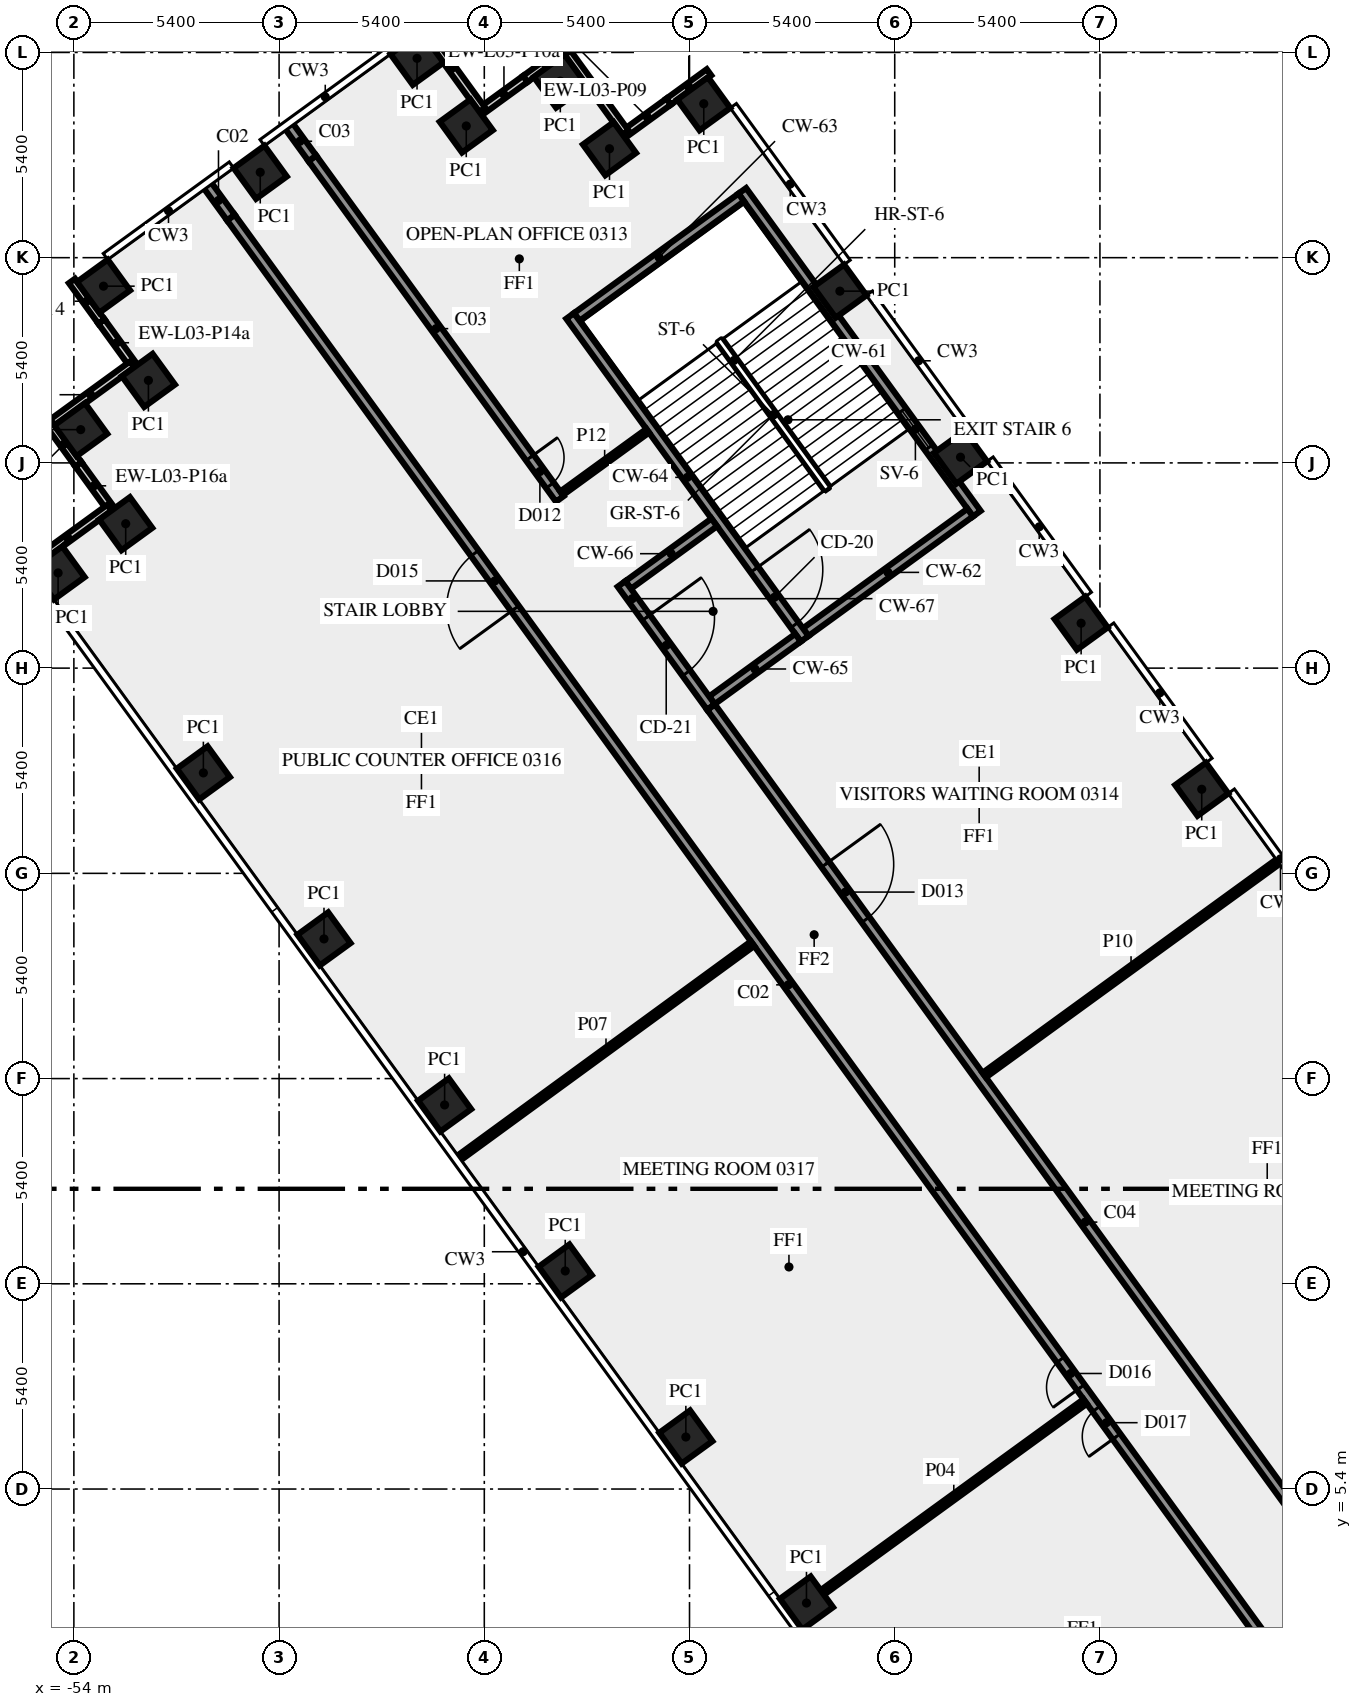
"""IFC4 building model, lengths in metres.
Left out: names, types, materials, properties, quantities, classifications, styles, units other than length and angle.
Written with IfcOpenShell. Run it as: python <this file> out.ifc"""

import sys

from ifc_helpers import new_model, si_unit, direction, frame, frame_2d, origin, origin_2d, place, context, subcontext, project, spatial, rectangle, extrude, element, fill, save


model = new_model("IFC4")
c1 = context("Model", 3, precision=1e-05, world=origin(), true_north=direction((0.0, 1.0)))
c2 = subcontext(c1, "Body", "Model", "MODEL_VIEW")
j1 = project(units=[si_unit("LENGTHUNIT", "METRE"), si_unit("PLANEANGLEUNIT", "RADIAN")], contexts=[c1])
p1 = place(None, origin())
s1 = spatial("IfcSite", under=j1, at=p1, CompositionType="ELEMENT")
p2 = place(p1, origin())
s2 = spatial("IfcBuilding", under=s1, at=p2, CompositionType="ELEMENT")
p3 = place(p2, frame((0.0, 0.0, 16.0)))
s3 = spatial("IfcBuildingStorey", under=s2, at=p3, CompositionType="ELEMENT", Elevation=16.0)
for number, where, z_axis, x_axis in (
    (1, (-24.321, 23.812, 0.0), (0.0, 0.0, 1.0), (-0.588, 0.809, 0.0)),
    (2, (-27.495, 28.181, 0.0), (0.0, 0.0, 1.0), (-0.588, 0.809, 0.0)),
    (3, (-30.669, 32.55, 0.0), (0.0, 0.0, 1.0), (-0.588, 0.809, 0.0)),
    (4, (-33.843, 36.919, 0.0), (0.0, 0.0, 1.0), (-0.588, 0.809, 0.0)),
    (5, (-37.425, 41.85, 0.0), (0.0, 0.0, 1.0), (-0.588, 0.809, 0.0)),
    (6, (-39.906, 40.666, 0.0), (0.0, 0.0, 1.0), (-0.588, 0.809, 0.0)),
    (7, (-41.2, 42.445, 0.0), (0.0, 0.0, 1.0), (-0.588, 0.809, 0.0)),
    (8, (-43.675, 41.265, 0.0), (0.0, 0.0, 1.0), (-0.809, -0.588, 0.0)),
    (9, (-44.97, 43.045, 0.0), (0.0, 0.0, 1.0), (-0.809, -0.588, 0.0)),
    (10, (-49.096, 40.047, 0.0), (0.0, 0.0, 1.0), (-0.809, -0.588, 0.0)),
    (11, (-53.22, 37.05, 0.0), (0.0, 0.0, 1.0), (0.588, -0.809, 0.0)),
    (12, (-52.039, 34.571, 0.0), (0.0, 0.0, 1.0), (-0.809, -0.588, 0.0)),
    (13, (-53.82, 33.275, 0.0), (0.0, 0.0, 1.0), (0.588, -0.809, 0.0)),
    (14, (-52.636, 30.8, 0.0), (0.0, 0.0, 1.0), (-0.809, -0.588, 0.0)),
    (15, (-54.415, 29.505, 0.0), (0.0, 0.0, 1.0), (0.588, -0.809, 0.0)),
    (16, (-50.592, 24.243, 0.0), (0.0, 0.0, 1.0), (0.588, -0.809, 0.0)),
    (17, (-47.418, 19.875, 0.0), (0.0, 0.0, 1.0), (0.588, -0.809, 0.0)),
    (18, (-44.244, 15.506, 0.0), (0.0, 0.0, 1.0), (0.588, -0.809, 0.0)),
    (19, (-41.07, 11.137, 0.0), (0.0, 0.0, 1.0), (0.588, -0.809, 0.0)),
    (20, (-37.896, 6.769, 0.0), (0.0, 0.0, 1.0), (0.588, -0.809, 0.0)),
    (21, (-34.722, 2.4, 0.0), (0.0, 0.0, 1.0), (0.588, -0.809, 0.0)),
):
    element("IfcColumn", number, at=place(p3, frame(where, z_axis=z_axis, x_axis=x_axis)), inside=s3, PredefinedType="COLUMN", context=c2, shape_type="SweptSolid", body=[
        extrude(rectangle(XDim=1.0, YDim=1.0, at=origin_2d()), origin(), (0.0, 0.0, 1.0), 4.1),
    ])
p4 = place(p3, frame((-37.287, 42.678, 0.0), z_axis=(0.0, 0.0, 1.0), x_axis=(-0.809065186597, -0.587718915671, 0.0)))
e22 = element("IfcWall", 22, at=p4, inside=s3, PredefinedType="SOLIDWALL", context=c2, shape_type="SweptSolid", body=[
    extrude(rectangle(XDim=1.315, YDim=0.2, at=frame_2d((0.657, 0.0))), origin(), (0.0, 0.0, 1.0), 4.1),
])
p5 = place(p3, frame((-38.351, 41.905, 0.0), z_axis=(0.0, 0.0, 1.0), x_axis=(-0.809002762913, -0.58780483972, 0.0)))
e23 = element("IfcWall", 23, at=p5, inside=s3, PredefinedType="SOLIDWALL", context=c2, shape_type="SweptSolid", body=[
    extrude(rectangle(XDim=1.385, YDim=0.2, at=frame_2d((0.693, 0.0))), origin(), (0.0, 0.0, 1.0), 3.1),
])
p6 = place(p3, frame((-39.488, 41.094, 0.0), z_axis=(0.0, 0.0, 1.0), x_axis=(-0.587806000234, 0.809001919707, 0.0)))
e24 = element("IfcWall", 24, at=p6, inside=s3, PredefinedType="SOLIDWALL", context=c2, shape_type="SweptSolid", body=[
    extrude(rectangle(XDim=2.7, YDim=0.2, at=frame_2d((1.35, 0.0))), origin(), (0.0, 0.0, 1.0), 4.1),
])
p7 = place(p3, frame((-41.058, 43.275, 0.0), z_axis=(0.0, 0.0, 1.0), x_axis=(-0.809056865039, -0.587730371117, 0.0)))
e25 = element("IfcWall", 25, at=p7, inside=s3, PredefinedType="SOLIDWALL", context=c2, shape_type="SweptSolid", body=[
    extrude(rectangle(XDim=1.316, YDim=0.2, at=frame_2d((0.658, 0.0))), origin(), (0.0, 0.0, 1.0), 4.1),
])
p8 = place(p3, frame((-42.123, 42.502, 0.0), z_axis=(0.0, 0.0, 1.0), x_axis=(-0.808926734208, -0.5879094647, 0.0)))
e26 = element("IfcWall", 26, at=p8, inside=s3, PredefinedType="SOLIDWALL", context=c2, shape_type="SweptSolid", body=[
    extrude(rectangle(XDim=1.384, YDim=0.2, at=frame_2d((0.692, 0.0))), origin(), (0.0, 0.0, 1.0), 3.1),
])
p9 = place(p3, frame((-43.259, 41.691, 0.0), z_axis=(0.0, 0.0, 1.0), x_axis=(-0.587822180636, 0.808990163075, 0.0)))
e27 = element("IfcWall", 27, at=p9, inside=s3, PredefinedType="SOLIDWALL", context=c2, shape_type="SweptSolid", body=[
    extrude(rectangle(XDim=2.7, YDim=0.2, at=frame_2d((1.35, 0.0))), origin(), (0.0, 0.0, 1.0), 4.1),
])
p10 = place(p3, frame((-54.05, 37.188, 0.0), z_axis=(0.0, 0.0, 1.0), x_axis=(0.58786388341, -0.808959859686, 0.0)))
e28 = element("IfcWall", 28, at=p10, inside=s3, PredefinedType="SOLIDWALL", context=c2, shape_type="SweptSolid", body=[
    extrude(rectangle(XDim=1.321, YDim=0.2, at=frame_2d((0.66, 0.0))), origin(), (0.0, 0.0, 1.0), 4.1),
])
p11 = place(p3, frame((-53.273, 36.12, 0.0), z_axis=(0.0, 0.0, 1.0), x_axis=(0.587782252522, -0.809019173827, 0.0)))
e29 = element("IfcWall", 29, at=p11, inside=s3, PredefinedType="SOLIDWALL", context=c2, shape_type="SweptSolid", body=[
    extrude(rectangle(XDim=1.379, YDim=0.2, at=frame_2d((0.69, 0.0))), origin(), (0.0, 0.0, 1.0), 3.1),
])
p12 = place(p3, frame((-52.465, 34.987, 0.0), z_axis=(0.0, 0.0, 1.0), x_axis=(-0.809033161865, -0.587762999008, 0.0)))
e30 = element("IfcWall", 30, at=p12, inside=s3, PredefinedType="SOLIDWALL", context=c2, shape_type="SweptSolid", body=[
    extrude(rectangle(XDim=2.7, YDim=0.2, at=frame_2d((1.35, 0.0))), origin(), (0.0, 0.0, 1.0), 4.1),
])
p13 = place(p3, frame((-54.647, 33.417, 0.0), z_axis=(0.0, 0.0, 1.0), x_axis=(0.587871379726, -0.808954412127, 0.0)))
e31 = element("IfcWall", 31, at=p13, inside=s3, PredefinedType="SOLIDWALL", context=c2, shape_type="SweptSolid", body=[
    extrude(rectangle(XDim=1.305, YDim=0.2, at=frame_2d((0.653, 0.0))), origin(), (0.0, 0.0, 1.0), 4.1),
])
p14 = place(p3, frame((-53.88, 32.361, 0.0), z_axis=(0.0, 0.0, 1.0), x_axis=(0.587776137069, -0.809023616894, 0.0)))
e32 = element("IfcWall", 32, at=p14, inside=s3, PredefinedType="SOLIDWALL", context=c2, shape_type="SweptSolid", body=[
    extrude(rectangle(XDim=1.395, YDim=0.2, at=frame_2d((0.697, 0.0))), origin(), (0.0, 0.0, 1.0), 3.1),
])
p15 = place(p3, frame((-53.063, 31.216, 0.0), z_axis=(0.0, 0.0, 1.0), x_axis=(-0.809033161865, -0.587762999008, 0.0)))
e33 = element("IfcWall", 33, at=p15, inside=s3, PredefinedType="SOLIDWALL", context=c2, shape_type="SweptSolid", body=[
    extrude(rectangle(XDim=2.7, YDim=0.2, at=frame_2d((1.35, 0.0))), origin(), (0.0, 0.0, 1.0), 4.1),
])
p16 = place(p3, frame((-30.24, 31.064, 0.0), z_axis=(0.0, 0.0, 1.0), x_axis=(-0.587795589702, 0.809009483706, 0.0)))
e34 = element("IfcWall", 34, at=p16, inside=s3, PredefinedType="SHEAR", context=c2, shape_type="SweptSolid", body=[
    extrude(rectangle(XDim=10.5, YDim=0.25, at=frame_2d((5.25, 0.0))), origin(), (0.0, 0.0, 1.0), 4.1),
])
p17 = place(p16, frame((2.15, 0.0, 1.0)))
e35 = element("IfcOpeningElement", 35, at=p17, cuts=e34, PredefinedType="OPENING", context=c2, shape_type="SweptSolid", body=[
    extrude(rectangle(XDim=1.2, YDim=1.2, at=frame_2d((0.6, 0.6))), frame((0.0, 0.135, 0.0), z_axis=(0.0, -1.0, 0.0), x_axis=(1.0, 0.0, 0.0)), (0.0, 0.0, 1.0), 0.27),
])
p18 = place(p3, frame((-30.414, 31.092, 0.0), z_axis=(0.0, 0.0, 1.0), x_axis=(-0.8089984606, -0.587810760999, 0.0)))
e36 = element("IfcWall", 36, at=p18, inside=s3, PredefinedType="SHEAR", context=c2, shape_type="SweptSolid", body=[
    extrude(rectangle(XDim=5.35, YDim=0.25, at=frame_2d((2.675, 0.0))), origin(), (0.0, 0.0, 1.0), 4.1),
])
p19 = place(p3, frame((-36.439, 39.384, 0.0), z_axis=(0.0, 0.0, 1.0), x_axis=(-0.809020161303, -0.587780893365, 0.0)))
e37 = element("IfcWall", 37, at=p19, inside=s3, PredefinedType="SHEAR", context=c2, shape_type="SweptSolid", body=[
    extrude(rectangle(XDim=5.35, YDim=0.25, at=frame_2d((2.675, 0.0))), origin(), (0.0, 0.0, 1.0), 4.1),
])
p20 = place(p3, frame((-40.942, 36.267, 0.0), z_axis=(0.0, 0.0, 1.0), x_axis=(0.587795589702, -0.809009483706, 0.0)))
e38 = element("IfcWall", 38, at=p20, inside=s3, PredefinedType="SHEAR", context=c2, shape_type="SweptSolid", body=[
    extrude(rectangle(XDim=10.5, YDim=0.25, at=frame_2d((5.25, 0.0))), origin(), (0.0, 0.0, 1.0), 4.1),
])
p21 = place(p20, frame((8.25, 0.0, 0.0)))
e39 = element("IfcOpeningElement", 39, at=p21, cuts=e38, PredefinedType="OPENING", context=c2, shape_type="SweptSolid", body=[
    extrude(rectangle(XDim=1.8, YDim=2.1, at=frame_2d((0.9, 1.05))), frame((0.0, 0.135, 0.0), z_axis=(0.0, -1.0, 0.0), x_axis=(1.0, 0.0, 0.0)), (0.0, 0.0, 1.0), 0.27),
])
for number, where, z_axis, x_axis in (
    (40, (-34.945, 27.8, 0.0), (0.0, 0.0, 1.0), (-0.809, -0.588, 0.0)),
    (41, (-37.149, 30.834, 0.0), (0.0, 0.0, 1.0), (-0.809, -0.588, 0.0)),
):
    element("IfcWall", number, at=place(p3, frame(where, z_axis=z_axis, x_axis=x_axis)), inside=s3, PredefinedType="SHEAR", context=c2, shape_type="SweptSolid", body=[
        extrude(rectangle(XDim=2.8, YDim=0.25, at=frame_2d((1.4, 0.0))), origin(), (0.0, 0.0, 1.0), 4.1),
    ])
p22 = place(p3, frame((-39.589, 29.216, 0.0), z_axis=(0.0, 0.0, 1.0), x_axis=(0.587772420479, -0.809026317077, 0.0)))
e42 = element("IfcWall", 42, at=p22, inside=s3, PredefinedType="SHEAR", context=c2, shape_type="SweptSolid", body=[
    extrude(rectangle(XDim=4.0, YDim=0.25, at=frame_2d((2.0, 0.0))), origin(), (0.0, 0.0, 1.0), 4.1),
])
p23 = place(p22, frame((1.1, 0.0, 0.0)))
e43 = element("IfcOpeningElement", 43, at=p23, cuts=e42, PredefinedType="OPENING", context=c2, shape_type="SweptSolid", body=[
    extrude(rectangle(XDim=1.8, YDim=2.1, at=frame_2d((0.9, 1.05))), frame((0.0, 0.135, 0.0), z_axis=(0.0, -1.0, 0.0), x_axis=(1.0, 0.0, 0.0)), (0.0, 0.0, 1.0), 0.27),
])
p24 = place(p3, frame((-20.531, -1.523, 0.0), z_axis=(0.0, 0.0, 1.0), x_axis=(-0.587784522481, 0.809017524614, 0.0)))
e44 = element("IfcWall", 44, at=p24, inside=s3, PredefinedType="SOLIDWALL", context=c2, shape_type="SweptSolid", body=[
    extrude(rectangle(XDim=49.912, YDim=0.25, at=frame_2d((24.956, 0.0))), origin(), (0.0, 0.0, 1.0), 4.1),
])
p25 = place(p24, frame((10.266, 0.0, 0.0)))
e45 = element("IfcOpeningElement", 45, at=p25, cuts=e44, PredefinedType="OPENING", context=c2, shape_type="SweptSolid", body=[
    extrude(rectangle(XDim=0.9, YDim=2.1, at=frame_2d((0.45, 1.05))), frame((0.0, 0.135, 0.0), z_axis=(0.0, -1.0, 0.0), x_axis=(1.0, 0.0, 0.0)), (0.0, 0.0, 1.0), 0.27),
])
p26 = place(p24, frame((37.193, 0.0, 0.0)))
e46 = element("IfcOpeningElement", 46, at=p26, cuts=e44, PredefinedType="OPENING", context=c2, shape_type="SweptSolid", body=[
    extrude(rectangle(XDim=1.8, YDim=2.1, at=frame_2d((0.9, 1.05))), frame((0.0, 0.135, 0.0), z_axis=(0.0, -1.0, 0.0), x_axis=(1.0, 0.0, 0.0)), (0.0, 0.0, 1.0), 0.27),
])
p27 = place(p24, frame((11.866, 0.0, 0.0)))
e47 = element("IfcOpeningElement", 47, at=p27, cuts=e44, PredefinedType="OPENING", context=c2, shape_type="SweptSolid", body=[
    extrude(rectangle(XDim=0.9, YDim=2.1, at=frame_2d((0.45, 1.05))), frame((0.0, 0.135, 0.0), z_axis=(0.0, -1.0, 0.0), x_axis=(1.0, 0.0, 0.0)), (0.0, 0.0, 1.0), 0.27),
])
p28 = place(p3, frame((-47.725, 40.414, 0.0), z_axis=(0.0, 0.0, 1.0), x_axis=(0.587773291021, -0.809025684612, 0.0)))
e48 = element("IfcWall", 48, at=p28, inside=s3, PredefinedType="SOLIDWALL", context=c2, shape_type="SweptSolid", body=[
    extrude(rectangle(XDim=11.079, YDim=0.25, at=frame_2d((5.539, 0.0))), origin(), (0.0, 0.0, 1.0), 4.1),
])
p29 = place(p28, frame((9.737, 0.0, 0.0)))
e49 = element("IfcOpeningElement", 49, at=p29, cuts=e48, PredefinedType="OPENING", context=c2, shape_type="SweptSolid", body=[
    extrude(rectangle(XDim=0.9, YDim=2.1, at=frame_2d((0.45, 1.05))), frame((0.0, 0.135, 0.0), z_axis=(0.0, -1.0, 0.0), x_axis=(1.0, 0.0, 0.0)), (0.0, 0.0, 1.0), 0.27),
])
p30 = place(p3, frame((-37.232, 25.972, 0.0), z_axis=(0.0, 0.0, 1.0), x_axis=(0.587786323093, -0.809016216391, 0.0)))
e50 = element("IfcWall", 50, at=p30, inside=s3, PredefinedType="SOLIDWALL", context=c2, shape_type="SweptSolid", body=[
    extrude(rectangle(XDim=33.493, YDim=0.25, at=frame_2d((16.747, 0.0))), origin(), (0.0, 0.0, 1.0), 4.1),
])
p31 = place(p30, frame((29.152, 0.0, 0.0)))
e51 = element("IfcOpeningElement", 51, at=p31, cuts=e50, PredefinedType="OPENING", context=c2, shape_type="SweptSolid", body=[
    extrude(rectangle(XDim=0.9, YDim=2.1, at=frame_2d((0.45, 1.05))), frame((0.0, 0.135, 0.0), z_axis=(0.0, -1.0, 0.0), x_axis=(1.0, 0.0, 0.0)), (0.0, 0.0, 1.0), 0.27),
])
p32 = place(p30, frame((5.113, 0.0, 0.0)))
e52 = element("IfcOpeningElement", 52, at=p32, cuts=e50, PredefinedType="OPENING", context=c2, shape_type="SweptSolid", body=[
    extrude(rectangle(XDim=1.8, YDim=2.1, at=frame_2d((0.9, 1.05))), frame((0.0, 0.135, 0.0), z_axis=(0.0, -1.0, 0.0), x_axis=(1.0, 0.0, 0.0)), (0.0, 0.0, 1.0), 0.27),
])
p33 = place(p3, frame((-27.389, 7.703, 0.0), z_axis=(0.0, 0.0, 1.0), x_axis=(-0.809054740315, -0.587733295955, 0.0)))
e53 = element("IfcWall", 53, at=p33, inside=s3, PredefinedType="PARTITIONING", context=c2, shape_type="SweptSolid", body=[
    extrude(rectangle(XDim=8.545, YDim=0.15, at=frame_2d((4.272, 0.0))), origin(), (0.0, 0.0, 1.0), 4.1),
])
p34 = place(p3, frame((-43.854, 14.118, 0.0), z_axis=(0.0, 0.0, 1.0), x_axis=(0.807691251741, 0.589605666408, 0.0)))
e54 = element("IfcWall", 54, at=p34, inside=s3, PredefinedType="PARTITIONING", context=c2, shape_type="SweptSolid", body=[
    extrude(rectangle(XDim=9.55, YDim=0.15, at=frame_2d((4.775, 0.0))), origin(), (0.0, 0.0, 1.0), 3.1),
])
p35 = place(p3, frame((-22.318, 21.906, 0.0), z_axis=(0.0, 0.0, 1.0), x_axis=(-0.80898585166, -0.587828114175, 0.0)))
e55 = element("IfcWall", 55, at=p35, inside=s3, PredefinedType="PARTITIONING", context=c2, shape_type="SweptSolid", body=[
    extrude(rectangle(XDim=9.55, YDim=0.15, at=frame_2d((4.775, 0.0))), origin(), (0.0, 0.0, 1.0), 3.1),
])
p36 = place(p3, frame((-41.166, 31.599, 0.0), z_axis=(0.0, 0.0, 1.0), x_axis=(0.809090262332, 0.587684394381, 0.0)))
e56 = element("IfcWall", 56, at=p36, inside=s3, PredefinedType="PARTITIONING", context=c2, shape_type="SweptSolid", body=[
    extrude(rectangle(XDim=2.801, YDim=0.12, at=frame_2d((1.4, 0.0))), origin(), (0.0, 0.0, 1.0), 4.1),
])
p37 = place(p3, frame((-49.869, 38.856, 0.0), z_axis=(0.0, 0.0, 1.0), x_axis=(-0.587674273289, 0.809097613712, 0.0)))
e57 = element("IfcWall", 57, at=p37, inside=s3, PredefinedType="SOLIDWALL", context=c2, shape_type="SweptSolid", body=[
    extrude(rectangle(XDim=1.109, YDim=0.25, at=frame_2d((0.555, 0.0))), origin(), (0.0, 0.0, 1.0), 3.1),
])
p38 = place(p3, frame((-47.725, 40.414, 0.0), z_axis=(0.0, 0.0, 1.0), x_axis=(-0.587883639643, 0.808945502639, 0.0)))
e58 = element("IfcWall", 58, at=p38, inside=s3, PredefinedType="SOLIDWALL", context=c2, shape_type="SweptSolid", body=[
    extrude(rectangle(XDim=1.109, YDim=0.25, at=frame_2d((0.554, 0.0))), origin(), (0.0, 0.0, 1.0), 3.1),
])
p39 = place(p17, origin())
e59 = element("IfcWindow", 59, at=p39, inside=s3, PartitioningType="SINGLE_PANEL", PredefinedType="WINDOW", context=c2, shape_type="SweptSolid", body=[
    extrude(rectangle(XDim=1.2, YDim=1.2, at=frame_2d((0.6, 0.6))), frame((0.0, 0.03, 0.0), z_axis=(0.0, -1.0, 0.0), x_axis=(1.0, 0.0, 0.0)), (0.0, 0.0, 1.0), 0.06),
])
fill(e35, e59)
p40 = place(p21, origin())
e60 = element("IfcDoor", 60, at=p40, inside=s3, OperationType="DOUBLE_DOOR_SINGLE_SWING", PredefinedType="DOOR", context=c2, shape_type="SweptSolid", body=[
    extrude(rectangle(XDim=1.8, YDim=2.1, at=frame_2d((0.9, 1.05))), frame((0.0, 0.025, 0.0), z_axis=(0.0, -1.0, 0.0), x_axis=(1.0, 0.0, 0.0)), (0.0, 0.0, 1.0), 0.05),
])
fill(e39, e60)
p41 = place(p23, origin())
e61 = element("IfcDoor", 61, at=p41, inside=s3, OperationType="DOUBLE_DOOR_SINGLE_SWING", PredefinedType="DOOR", context=c2, shape_type="SweptSolid", body=[
    extrude(rectangle(XDim=1.8, YDim=2.1, at=frame_2d((0.9, 1.05))), frame((0.0, 0.025, 0.0), z_axis=(0.0, -1.0, 0.0), x_axis=(1.0, 0.0, 0.0)), (0.0, 0.0, 1.0), 0.05),
])
fill(e43, e61)
p42 = place(p29, origin())
e62 = element("IfcDoor", 62, at=p42, inside=s3, OperationType="SINGLE_SWING_RIGHT", PredefinedType="DOOR", context=c2, shape_type="SweptSolid", body=[
    extrude(rectangle(XDim=0.9, YDim=2.1, at=frame_2d((0.45, 1.05))), frame((0.0, 0.025, 0.0), z_axis=(0.0, -1.0, 0.0), x_axis=(1.0, 0.0, 0.0)), (0.0, 0.0, 1.0), 0.05),
])
fill(e49, e62)
p43 = place(p25, origin())
e63 = element("IfcDoor", 63, at=p43, inside=s3, OperationType="SINGLE_SWING_RIGHT", PredefinedType="DOOR", context=c2, shape_type="SweptSolid", body=[
    extrude(rectangle(XDim=0.9, YDim=2.1, at=frame_2d((0.45, 1.05))), frame((0.0, 0.025, 0.0), z_axis=(0.0, -1.0, 0.0), x_axis=(1.0, 0.0, 0.0)), (0.0, 0.0, 1.0), 0.05),
])
fill(e45, e63)
p44 = place(p26, origin())
e64 = element("IfcDoor", 64, at=p44, inside=s3, OperationType="DOUBLE_DOOR_SINGLE_SWING", PredefinedType="DOOR", context=c2, shape_type="SweptSolid", body=[
    extrude(rectangle(XDim=1.8, YDim=2.1, at=frame_2d((0.9, 1.05))), frame((0.0, 0.025, 0.0), z_axis=(0.0, -1.0, 0.0), x_axis=(1.0, 0.0, 0.0)), (0.0, 0.0, 1.0), 0.05),
])
fill(e46, e64)
p45 = place(p27, origin())
e65 = element("IfcDoor", 65, at=p45, inside=s3, OperationType="SINGLE_SWING_LEFT", PredefinedType="DOOR", context=c2, shape_type="SweptSolid", body=[
    extrude(rectangle(XDim=0.9, YDim=2.1, at=frame_2d((0.45, 1.05))), frame((0.0, 0.025, 0.0), z_axis=(0.0, -1.0, 0.0), x_axis=(1.0, 0.0, 0.0)), (0.0, 0.0, 1.0), 0.05),
])
fill(e47, e65)
p46 = place(p32, origin())
e66 = element("IfcDoor", 66, at=p46, inside=s3, OperationType="DOUBLE_DOOR_SINGLE_SWING", PredefinedType="DOOR", context=c2, shape_type="SweptSolid", body=[
    extrude(rectangle(XDim=1.8, YDim=2.1, at=frame_2d((0.9, 1.05))), frame((0.0, 0.025, 0.0), z_axis=(0.0, -1.0, 0.0), x_axis=(1.0, 0.0, 0.0)), (0.0, 0.0, 1.0), 0.05),
])
fill(e52, e66)
save(model, sys.argv[1])
